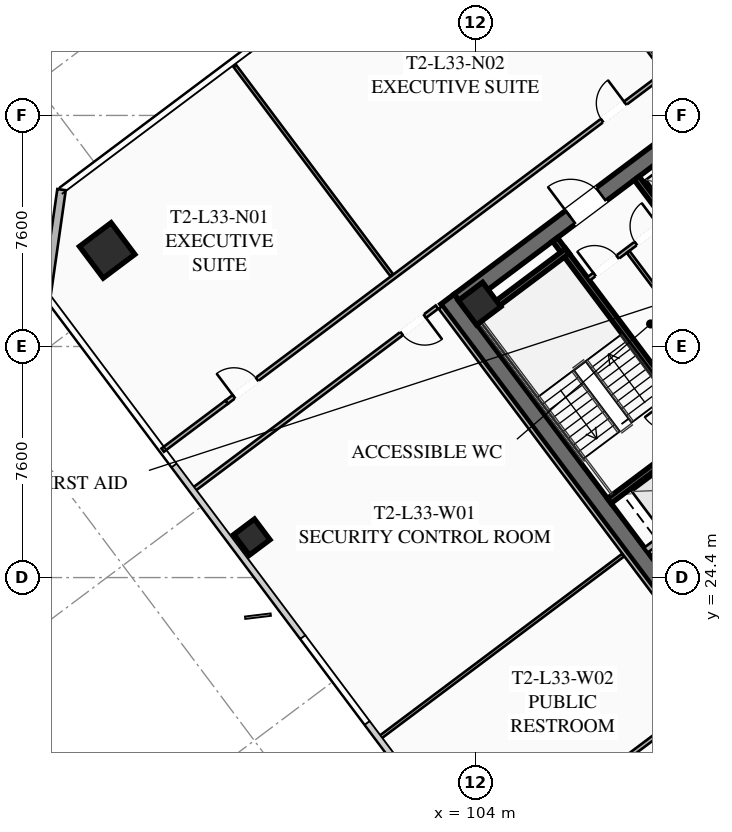
"""IFC4 building model, lengths in metres.
Left out: names, types, materials, properties, quantities, classifications, styles, units other than length and angle.
Written with IfcOpenShell. Run it as: python <this file> out.ifc"""

import sys

from ifc_helpers import new_model, si_unit, direction, frame, frame_2d, origin, origin_2d, place, context, subcontext, project, spatial, rectangle, hollow_rectangle, extrude, element, fill, save


model = new_model("IFC4")
c1 = context("Model", 3, precision=1e-05, world=origin(), true_north=direction((0.0, 1.0)))
c2 = subcontext(c1, "Body", "Model", "MODEL_VIEW")
j1 = project(units=[si_unit("LENGTHUNIT", "METRE"), si_unit("PLANEANGLEUNIT", "RADIAN")], contexts=[c1])
p1 = place(None, origin())
s1 = spatial("IfcSite", under=j1, at=p1, CompositionType="ELEMENT")
p2 = place(p1, origin())
s2 = spatial("IfcBuilding", under=s1, at=p2, CompositionType="ELEMENT")
p3 = place(p2, frame((0.0, 0.0, 125.05)))
s3 = spatial("IfcBuildingStorey", under=s2, at=p3, CompositionType="ELEMENT", Elevation=125.05)
p4 = place(p3, frame((112.436, 21.077, 0.0), z_axis=(0.0, 0.0, 1.0), x_axis=(-0.600005007985, 0.799996243986, 0.0)))
e1 = element("IfcWall", 1, at=p4, inside=s3, PredefinedType="SHEAR", context=c2, shape_type="SweptSolid", body=[
    extrude(rectangle(XDim=15.6, YDim=0.55, at=frame_2d((7.8, 0.0))), origin(), (0.0, 0.0, 1.0), 3.55),
])
p5 = place(p3, frame((103.461, 33.502, 0.0), z_axis=(0.0, 0.0, 1.0), x_axis=(0.799998054672, 0.600002593761, 0.0)))
e2 = element("IfcWall", 2, at=p5, inside=s3, PredefinedType="SHEAR", context=c2, shape_type="SweptSolid", body=[
    extrude(rectangle(XDim=15.06, YDim=0.55, at=frame_2d((7.53, 0.0))), origin(), (0.0, 0.0, 1.0), 3.55),
])
p6 = place(p5, frame((4.58, 0.0, 0.0)))
e3 = element("IfcOpeningElement", 3, at=p6, cuts=e2, PredefinedType="OPENING", context=c2, shape_type="SweptSolid", body=[
    extrude(rectangle(XDim=1.25, YDim=2.25, at=frame_2d((0.625, 1.125))), frame((0.0, 0.285, 0.0), z_axis=(0.0, -1.0, 0.0), x_axis=(1.0, 0.0, 0.0)), (0.0, 0.0, 1.0), 0.57),
])
p7 = place(p5, frame((9.63, 0.0, 0.0)))
e4 = element("IfcOpeningElement", 4, at=p7, cuts=e2, PredefinedType="OPENING", context=c2, shape_type="SweptSolid", body=[
    extrude(rectangle(XDim=1.25, YDim=2.25, at=frame_2d((0.625, 1.125))), frame((0.0, 0.285, 0.0), z_axis=(0.0, -1.0, 0.0), x_axis=(1.0, 0.0, 0.0)), (0.0, 0.0, 1.0), 0.57),
])
p8 = place(p3, frame((104.13, 33.41, 0.0), z_axis=(0.0, 0.0, 1.0), x_axis=(0.799999996291, 0.600000004945, 0.0)))
e5 = element("IfcColumn", 5, at=p8, inside=s3, PredefinedType="COLUMN", context=c2, shape_type="SweptSolid", body=[
    extrude(hollow_rectangle(XDim=1.0, YDim=1.0, WallThickness=0.04, at=origin_2d()), origin(), (0.0, 0.0, 1.0), 3.37),
])
p9 = place(p3, frame((91.88, 35.16, 0.0), z_axis=(0.0, 0.0, 1.0), x_axis=(0.799999996291, 0.600000004945, 0.0)))
e6 = element("IfcColumn", 6, at=p9, inside=s3, PredefinedType="COLUMN", context=c2, shape_type="SweptSolid", body=[
    extrude(hollow_rectangle(XDim=1.3, YDim=1.3, WallThickness=0.05, at=origin_2d()), origin(), (0.0, 0.0, 1.0), 3.37),
])
p10 = place(p3, frame((96.64, 25.73, 0.0), z_axis=(0.0, 0.0, 1.0), x_axis=(0.799999996291, 0.600000004945, 0.0)))
e7 = element("IfcColumn", 7, at=p10, inside=s3, PredefinedType="COLUMN", context=c2, shape_type="SweptSolid", body=[
    extrude(hollow_rectangle(XDim=0.85, YDim=0.85, WallThickness=0.035, at=origin_2d()), origin(), (0.0, 0.0, 1.0), 3.37),
])
p11 = place(p3, frame((89.88, 33.66, 0.0), z_axis=(0.0, 0.0, 1.0), x_axis=(0.141421356237, 0.989949493661, 0.0)))
e8 = element("IfcWall", 8, at=p11, inside=s3, PredefinedType="SOLIDWALL", context=c2, shape_type="SweptSolid", body=[
    extrude(rectangle(XDim=3.536, YDim=0.28, at=frame_2d((1.768, 0.0))), origin(), (0.0, 0.0, 1.0), 3.37),
])
p12 = place(p3, frame((111.44, 29.08, 0.0), z_axis=(0.0, 0.0, 1.0), x_axis=(-0.59999029481, 0.8000072788, 0.0)))
e9 = element("IfcWall", 9, at=p12, inside=s3, PredefinedType="SHEAR", context=c2, shape_type="SweptSolid", body=[
    extrude(rectangle(XDim=8.05, YDim=0.2, at=frame_2d((4.025, 0.0))), origin(), (0.0, 0.0, 1.0), 3.37),
])
p13 = place(p12, frame((0.45, 0.0, 0.0)))
e10 = element("IfcOpeningElement", 10, at=p13, cuts=e9, PredefinedType="OPENING", context=c2, shape_type="SweptSolid", body=[
    extrude(rectangle(XDim=1.15, YDim=2.2, at=frame_2d((0.575, 1.1))), frame((0.0, 0.11, 0.0), z_axis=(0.0, -1.0, 0.0), x_axis=(1.0, 0.0, 0.0)), (0.0, 0.0, 1.0), 0.22),
])
for number, where, z_axis, x_axis in (
    (11, (108.396, 26.922, 0.0), (0.0, 0.0, 1.0), (0.8, 0.6, 0.0)),
    (12, (103.956, 32.842, 0.0), (0.0, 0.0, 1.0), (0.8, 0.6, 0.0)),
):
    element("IfcWall", number, at=place(p3, frame(where, z_axis=z_axis, x_axis=x_axis)), inside=s3, PredefinedType="SHEAR", context=c2, shape_type="SweptSolid", body=[
        extrude(rectangle(XDim=3.83, YDim=0.2, at=frame_2d((1.915, 0.0))), origin(), (0.0, 0.0, 1.0), 3.37),
    ])
p14 = place(p3, frame((117.998, 25.936, 0.0), z_axis=(0.0, 0.0, 1.0), x_axis=(-0.600002693989, 0.799997979501, 0.0)))
e13 = element("IfcWall", 13, at=p14, inside=s3, PredefinedType="SHEAR", context=c2, shape_type="SweptSolid", body=[
    extrude(rectangle(XDim=14.5, YDim=0.2, at=frame_2d((7.25, 0.0))), origin(), (0.0, 0.0, 1.0), 3.37),
])
p15 = place(p3, frame((109.608, 25.306, 0.0), z_axis=(0.0, 0.0, 1.0), x_axis=(0.8, 0.6, 0.0)))
e14 = element("IfcWall", 14, at=p15, inside=s3, PredefinedType="SOLIDWALL", context=c2, shape_type="SweptSolid", body=[
    extrude(rectangle(XDim=3.48, YDim=0.2, at=frame_2d((1.74, 0.0))), origin(), (0.0, 0.0, 1.0), 3.37),
])
p16 = place(p3, frame((107.71, 34.22, 0.0), z_axis=(0.0, 0.0, 1.0), x_axis=(0.799981399002, 0.60002480053, 0.0)))
e15 = element("IfcWall", 15, at=p16, inside=s3, PredefinedType="PARTITIONING", context=c2, shape_type="SweptSolid", body=[
    extrude(rectangle(XDim=3.15, YDim=0.135, at=frame_2d((1.575, 0.0))), origin(), (0.0, 0.0, 1.0), 2.723),
])
p17 = place(p16, frame((0.25, 0.0, 0.0)))
e16 = element("IfcOpeningElement", 16, at=p17, cuts=e15, PredefinedType="OPENING", context=c2, shape_type="SweptSolid", body=[
    extrude(rectangle(XDim=0.95, YDim=2.05, at=frame_2d((0.475, 1.025))), frame((0.0, 0.077, 0.0), z_axis=(0.0, -1.0, 0.0), x_axis=(1.0, 0.0, 0.0)), (0.0, 0.0, 1.0), 0.155),
])
p18 = place(p16, frame((1.95, 0.0, 0.0)))
e17 = element("IfcOpeningElement", 17, at=p18, cuts=e15, PredefinedType="OPENING", context=c2, shape_type="SweptSolid", body=[
    extrude(rectangle(XDim=0.95, YDim=2.05, at=frame_2d((0.475, 1.025))), frame((0.0, 0.077, 0.0), z_axis=(0.0, -1.0, 0.0), x_axis=(1.0, 0.0, 0.0)), (0.0, 0.0, 1.0), 0.155),
])
p19 = place(p3, frame((111.296, 32.072, 0.0), z_axis=(0.0, 0.0, 1.0), x_axis=(-0.59995887973, 0.800030838552, 0.0)))
e18 = element("IfcWall", 18, at=p19, inside=s3, PredefinedType="PARTITIONING", context=c2, shape_type="SweptSolid", body=[
    extrude(rectangle(XDim=3.8, YDim=0.11, at=frame_2d((1.9, 0.0))), origin(), (0.0, 0.0, 1.0), 2.723),
])
p20 = place(p3, frame((95.81, 30.17, 0.0), z_axis=(0.0, 0.0, 1.0), x_axis=(0.8, 0.6, 0.0)))
e19 = element("IfcWall", 19, at=p20, inside=s3, PredefinedType="PARTITIONING", context=c2, shape_type="SweptSolid", body=[
    extrude(rectangle(XDim=31.3, YDim=0.135, at=frame_2d((15.65, 0.0))), origin(), (0.0, 0.0, 1.0), 2.723),
])
p21 = place(p20, frame((0.3, 0.0, 0.0)))
e20 = element("IfcOpeningElement", 20, at=p21, cuts=e19, PredefinedType="OPENING", context=c2, shape_type="SweptSolid", body=[
    extrude(rectangle(XDim=0.95, YDim=2.05, at=frame_2d((0.475, 1.025))), frame((0.0, 0.077, 0.0), z_axis=(0.0, -1.0, 0.0), x_axis=(1.0, 0.0, 0.0)), (0.0, 0.0, 1.0), 0.155),
])
p22 = place(p20, frame((15.438, 0.0, 0.0)))
e21 = element("IfcOpeningElement", 21, at=p22, cuts=e19, PredefinedType="OPENING", context=c2, shape_type="SweptSolid", body=[
    extrude(rectangle(XDim=0.95, YDim=2.05, at=frame_2d((0.475, 1.025))), frame((0.0, 0.077, 0.0), z_axis=(0.0, -1.0, 0.0), x_axis=(1.0, 0.0, 0.0)), (0.0, 0.0, 1.0), 0.155),
])
p23 = place(p20, frame((30.05, 0.0, 0.0)))
e22 = element("IfcOpeningElement", 22, at=p23, cuts=e19, PredefinedType="OPENING", context=c2, shape_type="SweptSolid", body=[
    extrude(rectangle(XDim=0.95, YDim=2.05, at=frame_2d((0.475, 1.025))), frame((0.0, 0.077, 0.0), z_axis=(0.0, -1.0, 0.0), x_axis=(1.0, 0.0, 0.0)), (0.0, 0.0, 1.0), 0.155),
])
p24 = place(p3, frame((93.706, 28.592, 0.0), z_axis=(0.0, 0.0, 1.0), x_axis=(0.80002227902, 0.599970293491, 0.0)))
e23 = element("IfcWall", 23, at=p24, inside=s3, PredefinedType="PARTITIONING", context=c2, shape_type="SweptSolid", body=[
    extrude(rectangle(XDim=2.63, YDim=0.135, at=frame_2d((1.315, 0.0))), origin(), (0.0, 0.0, 1.0), 2.723),
])
for number, where, z_axis, x_axis in (
    (24, (101.242, 34.344, 0.0), (0.0, 0.0, 1.0), (-0.6, 0.8, 0.0)),
    (25, (110.202, 41.064, 0.0), (0.0, 0.0, 1.0), (-0.6, 0.8, 0.0)),
):
    element("IfcWall", number, at=place(p3, frame(where, z_axis=z_axis, x_axis=x_axis)), inside=s3, PredefinedType="PARTITIONING", context=c2, shape_type="SweptSolid", body=[
        extrude(rectangle(XDim=8.6, YDim=0.11, at=frame_2d((4.3, 0.0))), origin(), (0.0, 0.0, 1.0), 2.723),
    ])
p25 = place(p3, frame((133.012, 32.734, 0.0), z_axis=(0.0, 0.0, 1.0), x_axis=(-0.800003744006, -0.59999500796, 0.0)))
e26 = element("IfcWall", 26, at=p25, inside=s3, PredefinedType="PARTITIONING", context=c2, shape_type="SweptSolid", body=[
    extrude(rectangle(XDim=31.3, YDim=0.135, at=frame_2d((15.65, 0.0))), origin(), (0.0, 0.0, 1.0), 2.723),
])
p26 = place(p25, frame((29.97, 0.0, 0.0)))
e27 = element("IfcOpeningElement", 27, at=p26, cuts=e26, PredefinedType="OPENING", context=c2, shape_type="SweptSolid", body=[
    extrude(rectangle(XDim=0.95, YDim=2.05, at=frame_2d((0.475, 1.025))), frame((0.0, 0.077, 0.0), z_axis=(0.0, -1.0, 0.0), x_axis=(1.0, 0.0, 0.0)), (0.0, 0.0, 1.0), 0.155),
])
p27 = place(p25, frame((14.938, 0.0, 0.0)))
e28 = element("IfcOpeningElement", 28, at=p27, cuts=e26, PredefinedType="OPENING", context=c2, shape_type="SweptSolid", body=[
    extrude(rectangle(XDim=0.95, YDim=2.05, at=frame_2d((0.475, 1.025))), frame((0.0, 0.077, 0.0), z_axis=(0.0, -1.0, 0.0), x_axis=(1.0, 0.0, 0.0)), (0.0, 0.0, 1.0), 0.155),
])
p28 = place(p25, frame((0.38, 0.0, 0.0)))
e29 = element("IfcOpeningElement", 29, at=p28, cuts=e26, PredefinedType="OPENING", context=c2, shape_type="SweptSolid", body=[
    extrude(rectangle(XDim=0.95, YDim=2.05, at=frame_2d((0.475, 1.025))), frame((0.0, 0.077, 0.0), z_axis=(0.0, -1.0, 0.0), x_axis=(1.0, 0.0, 0.0)), (0.0, 0.0, 1.0), 0.155),
])
p29 = place(p3, frame((112.104, 20.928, 0.0), z_axis=(0.0, 0.0, 1.0), x_axis=(-0.599994940075, 0.800003794918, 0.0)))
e30 = element("IfcWall", 30, at=p29, inside=s3, PredefinedType="PARTITIONING", context=c2, shape_type="SweptSolid", body=[
    extrude(rectangle(XDim=15.44, YDim=0.135, at=frame_2d((7.72, 0.0))), origin(), (0.0, 0.0, 1.0), 2.723),
])
p30 = place(p3, frame((102.728, 33.296, 0.0), z_axis=(0.0, 0.0, 1.0), x_axis=(-0.800002918023, -0.599996109283, 0.0)))
e31 = element("IfcWall", 31, at=p30, inside=s3, PredefinedType="PARTITIONING", context=c2, shape_type="SweptSolid", body=[
    extrude(rectangle(XDim=10.04, YDim=0.135, at=frame_2d((5.02, 0.0))), origin(), (0.0, 0.0, 1.0), 2.723),
])
p31 = place(p30, frame((0.5, 0.0, 0.0)))
e32 = element("IfcOpeningElement", 32, at=p31, cuts=e31, PredefinedType="OPENING", context=c2, shape_type="SweptSolid", body=[
    extrude(rectangle(XDim=0.95, YDim=2.05, at=frame_2d((0.475, 1.025))), frame((0.0, 0.077, 0.0), z_axis=(0.0, -1.0, 0.0), x_axis=(1.0, 0.0, 0.0)), (0.0, 0.0, 1.0), 0.155),
])
p32 = place(p3, frame((104.056, 14.792, 0.0), z_axis=(0.0, 0.0, 1.0), x_axis=(0.800002918023, 0.599996109283, 0.0)))
e33 = element("IfcWall", 33, at=p32, inside=s3, PredefinedType="PARTITIONING", context=c2, shape_type="SweptSolid", body=[
    extrude(rectangle(XDim=10.04, YDim=0.135, at=frame_2d((5.02, 0.0))), origin(), (0.0, 0.0, 1.0), 2.723),
])
p33 = place(p32, frame((8.88, 0.0, 0.0)))
e34 = element("IfcOpeningElement", 34, at=p33, cuts=e33, PredefinedType="OPENING", context=c2, shape_type="SweptSolid", body=[
    extrude(rectangle(XDim=0.95, YDim=2.05, at=frame_2d((0.475, 1.025))), frame((0.0, 0.077, 0.0), z_axis=(0.0, -1.0, 0.0), x_axis=(1.0, 0.0, 0.0)), (0.0, 0.0, 1.0), 0.155),
])
p34 = place(p3, frame((100.816, 19.112, 0.0), z_axis=(0.0, 0.0, 1.0), x_axis=(0.800002918023, 0.599996109283, 0.0)))
e35 = element("IfcWall", 35, at=p34, inside=s3, PredefinedType="PARTITIONING", context=c2, shape_type="SweptSolid", body=[
    extrude(rectangle(XDim=10.04, YDim=0.11, at=frame_2d((5.02, 0.0))), origin(), (0.0, 0.0, 1.0), 2.723),
])
p35 = place(p6, origin())
e36 = element("IfcDoor", 36, at=p35, inside=s3, OperationType="SINGLE_SWING_LEFT", PredefinedType="DOOR", context=c2, shape_type="SweptSolid", body=[
    extrude(rectangle(XDim=1.25, YDim=2.25, at=frame_2d((0.625, 1.125))), frame((0.0, 0.025, 0.0), z_axis=(0.0, -1.0, 0.0), x_axis=(1.0, 0.0, 0.0)), (0.0, 0.0, 1.0), 0.05),
])
fill(e3, e36)
p36 = place(p17, origin())
e37 = element("IfcDoor", 37, at=p36, inside=s3, OperationType="SINGLE_SWING_LEFT", PredefinedType="DOOR", context=c2, shape_type="SweptSolid", body=[
    extrude(rectangle(XDim=0.95, YDim=2.05, at=frame_2d((0.475, 1.025))), frame((0.0, 0.025, 0.0), z_axis=(0.0, -1.0, 0.0), x_axis=(1.0, 0.0, 0.0)), (0.0, 0.0, 1.0), 0.05),
])
fill(e16, e37)
p37 = place(p18, origin())
e38 = element("IfcDoor", 38, at=p37, inside=s3, OperationType="SINGLE_SWING_RIGHT", PredefinedType="DOOR", context=c2, shape_type="SweptSolid", body=[
    extrude(rectangle(XDim=0.95, YDim=2.05, at=frame_2d((0.475, 1.025))), frame((0.0, 0.025, 0.0), z_axis=(0.0, -1.0, 0.0), x_axis=(1.0, 0.0, 0.0)), (0.0, 0.0, 1.0), 0.05),
])
fill(e17, e38)
p38 = place(p21, origin())
e39 = element("IfcDoor", 39, at=p38, inside=s3, OperationType="SINGLE_SWING_LEFT", PredefinedType="DOOR", context=c2, shape_type="SweptSolid", body=[
    extrude(rectangle(XDim=0.95, YDim=2.05, at=frame_2d((0.475, 1.025))), frame((0.0, 0.025, 0.0), z_axis=(0.0, -1.0, 0.0), x_axis=(1.0, 0.0, 0.0)), (0.0, 0.0, 1.0), 0.05),
])
fill(e20, e39)
p39 = place(p22, origin())
e40 = element("IfcDoor", 40, at=p39, inside=s3, OperationType="SINGLE_SWING_RIGHT", PredefinedType="DOOR", context=c2, shape_type="SweptSolid", body=[
    extrude(rectangle(XDim=0.95, YDim=2.05, at=frame_2d((0.475, 1.025))), frame((0.0, 0.025, 0.0), z_axis=(0.0, -1.0, 0.0), x_axis=(1.0, 0.0, 0.0)), (0.0, 0.0, 1.0), 0.05),
])
fill(e21, e40)
p40 = place(p31, origin())
e41 = element("IfcDoor", 41, at=p40, inside=s3, OperationType="SINGLE_SWING_LEFT", PredefinedType="DOOR", context=c2, shape_type="SweptSolid", body=[
    extrude(rectangle(XDim=0.95, YDim=2.05, at=frame_2d((0.475, 1.025))), frame((0.0, 0.025, 0.0), z_axis=(0.0, -1.0, 0.0), x_axis=(1.0, 0.0, 0.0)), (0.0, 0.0, 1.0), 0.05),
])
fill(e32, e41)
save(model, sys.argv[1])
